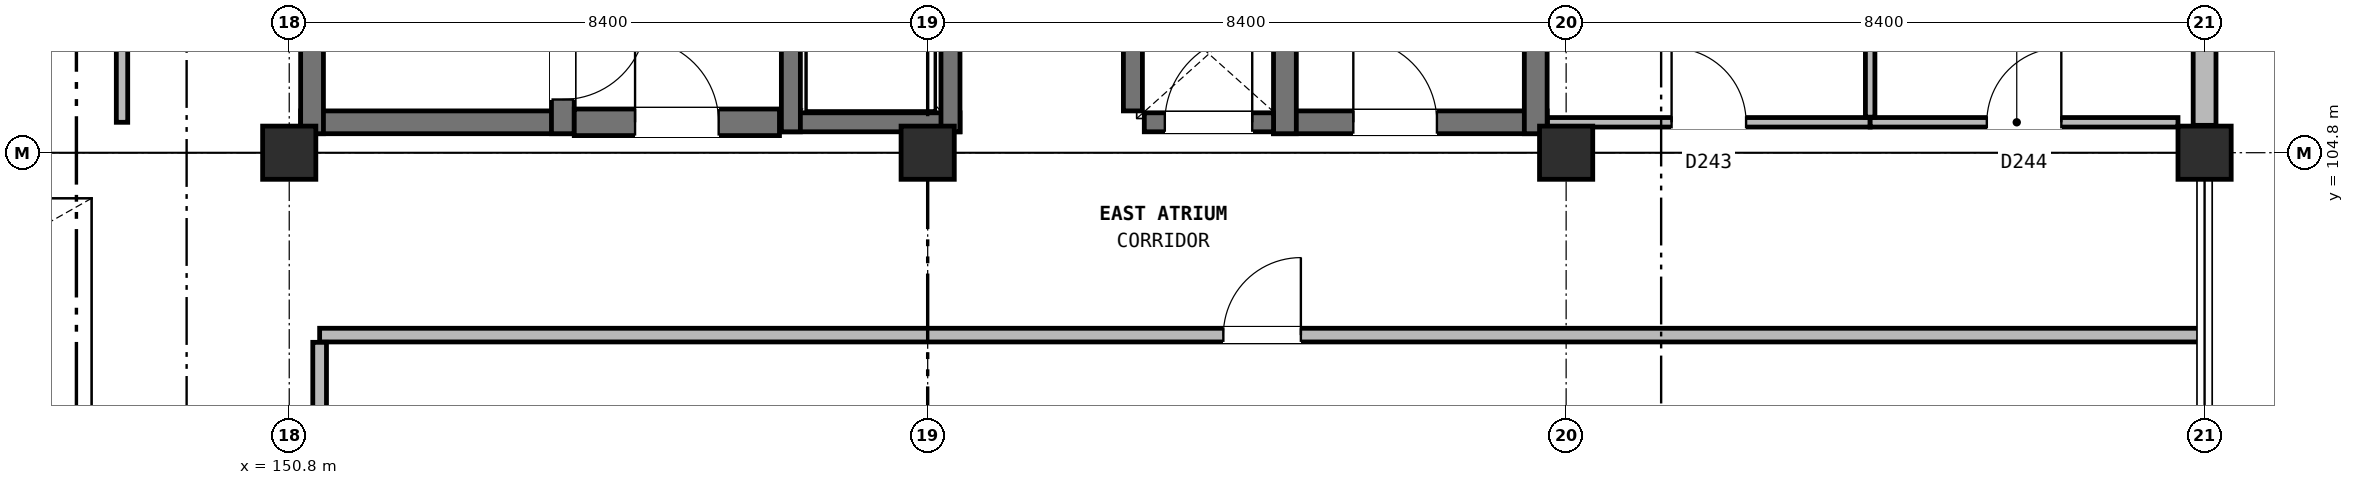
"""IFC4 building model, lengths in metres.
Left out: names, types, materials, properties, quantities, classifications, styles, units other than length and angle.
Written with IfcOpenShell. Run it as: python <this file> out.ifc"""

import sys

from ifc_helpers import new_model, si_unit, direction, frame, frame_2d, origin, origin_2d, place, context, subcontext, project, spatial, rectangle, extrude, element, fill, save


model = new_model("IFC4")
c1 = context("Model", 3, precision=1e-05, world=origin(), true_north=direction((0.0, 1.0)))
c2 = subcontext(c1, "Body", "Model", "MODEL_VIEW")
j1 = project(units=[si_unit("LENGTHUNIT", "METRE"), si_unit("PLANEANGLEUNIT", "RADIAN")], contexts=[c1])
p1 = place(None, origin())
s1 = spatial("IfcSite", under=j1, at=p1, CompositionType="ELEMENT")
p2 = place(p1, origin())
s2 = spatial("IfcBuilding", under=s1, at=p2, CompositionType="ELEMENT")
p3 = place(p2, frame((0.0, 0.0, 40.6)))
s3 = spatial("IfcBuildingStorey", under=s2, at=p3, CompositionType="ELEMENT", Elevation=40.6)
for number, where, z_axis, x_axis in (
    (1, (150.8, 104.8, 0.0), (0.0, 0.0, 1.0), (1.0, 0.0, 0.0)),
    (2, (159.2, 104.8, 0.0), (0.0, 0.0, 1.0), (1.0, 0.0, 0.0)),
    (3, (167.6, 104.8, 0.0), (0.0, 0.0, 1.0), (1.0, 0.0, 0.0)),
    (4, (176.0, 104.8, 0.0), (0.0, 0.0, 1.0), (1.0, 0.0, 0.0)),
):
    element("IfcColumn", number, at=place(p3, frame(where, z_axis=z_axis, x_axis=x_axis)), inside=s3, PredefinedType="COLUMN", context=c2, shape_type="SweptSolid", body=[
        extrude(rectangle(XDim=0.7, YDim=0.7, at=origin_2d()), origin(), (0.0, 0.0, 1.0), 3.8),
    ])
p4 = place(p3, frame((176.0, 105.16, 0.0), z_axis=(0.0, 0.0, 1.0), x_axis=(0.0, 1.0, 0.0)))
e5 = element("IfcWall", 5, at=p4, inside=s3, PredefinedType="SOLIDWALL", context=c2, shape_type="SweptSolid", body=[
    extrude(rectangle(XDim=8.08, YDim=0.3, at=frame_2d((4.04, 0.0))), origin(), (0.0, 0.0, 1.0), 3.05),
])
p5 = place(p4, frame((3.28, 0.0, 0.9)))
e6 = element("IfcOpeningElement", 6, at=p5, cuts=e5, PredefinedType="OPENING", context=c2, shape_type="SweptSolid", body=[
    extrude(rectangle(XDim=1.56, YDim=1.88, at=frame_2d((0.78, 0.94))), frame((0.0, 0.16, 0.0), z_axis=(0.0, -1.0, 0.0), x_axis=(1.0, 0.0, 0.0)), (0.0, 0.0, 1.0), 0.32),
])
p6 = place(p3, frame((150.95, 105.2, 0.0), z_axis=(0.0, 0.0, 1.0), x_axis=(1.0, 0.0, 0.0)))
e7 = element("IfcWall", 7, at=p6, inside=s3, PredefinedType="SHEAR", context=c2, shape_type="SweptSolid", body=[
    extrude(rectangle(XDim=3.6, YDim=0.3, at=frame_2d((1.8, 0.0))), origin(), (0.0, 0.0, 1.0), 3.8),
])
p7 = place(p3, frame((151.1, 105.05, 0.0), z_axis=(0.0, 0.0, 1.0), x_axis=(0.0, 1.0, 0.0)))
e8 = element("IfcWall", 8, at=p7, inside=s3, PredefinedType="SHEAR", context=c2, shape_type="SweptSolid", body=[
    extrude(rectangle(XDim=8.3, YDim=0.3, at=frame_2d((4.15, 0.0))), origin(), (0.0, 0.0, 1.0), 3.8),
])
p8 = place(p3, frame((154.4, 105.05, 0.0), z_axis=(0.0, 0.0, 1.0), x_axis=(0.0, 1.0, 0.0)))
e9 = element("IfcWall", 9, at=p8, inside=s3, PredefinedType="SHEAR", context=c2, shape_type="SweptSolid", body=[
    extrude(rectangle(XDim=8.3, YDim=0.3, at=frame_2d((4.15, 0.0))), origin(), (0.0, 0.0, 1.0), 3.8),
])
p9 = place(p8, frame((0.45, 0.0, 0.0)))
e10 = element("IfcOpeningElement", 10, at=p9, cuts=e9, PredefinedType="OPENING", context=c2, shape_type="SweptSolid", body=[
    extrude(rectangle(XDim=1.1, YDim=2.2, at=frame_2d((0.55, 1.1))), frame((0.0, 0.16, 0.0), z_axis=(0.0, -1.0, 0.0), x_axis=(1.0, 0.0, 0.0)), (0.0, 0.0, 1.0), 0.32),
])
p10 = place(p3, frame((163.75, 105.2, 0.0), z_axis=(0.0, 0.0, 1.0), x_axis=(1.0, 0.0, 0.0)))
e11 = element("IfcWall", 11, at=p10, inside=s3, PredefinedType="SHEAR", context=c2, shape_type="SweptSolid", body=[
    extrude(rectangle(XDim=3.6, YDim=0.3, at=frame_2d((1.8, 0.0))), origin(), (0.0, 0.0, 1.0), 3.8),
])
p11 = place(p10, frame((1.05, 0.0, 0.0)))
e12 = element("IfcOpeningElement", 12, at=p11, cuts=e11, PredefinedType="OPENING", context=c2, shape_type="SweptSolid", body=[
    extrude(rectangle(XDim=1.1, YDim=2.2, at=frame_2d((0.55, 1.1))), frame((0.0, 0.16, 0.0), z_axis=(0.0, -1.0, 0.0), x_axis=(1.0, 0.0, 0.0)), (0.0, 0.0, 1.0), 0.32),
])
for number, where, z_axis, x_axis in (
    (13, (163.9, 105.05, 0.0), (0.0, 0.0, 1.0), (0.0, 1.0, 0.0)),
    (14, (167.2, 105.05, 0.0), (0.0, 0.0, 1.0), (0.0, 1.0, 0.0)),
):
    element("IfcWall", number, at=place(p3, frame(where, z_axis=z_axis, x_axis=x_axis)), inside=s3, PredefinedType="SHEAR", context=c2, shape_type="SweptSolid", body=[
        extrude(rectangle(XDim=8.3, YDim=0.3, at=frame_2d((4.15, 0.0))), origin(), (0.0, 0.0, 1.0), 3.8),
    ])
p12 = place(p3, frame((157.275, 105.2, 0.0), z_axis=(0.0, 0.0, 1.0), x_axis=(1.0, 0.0, 0.0)))
e15 = element("IfcWall", 15, at=p12, inside=s3, PredefinedType="SOLIDWALL", context=c2, shape_type="SweptSolid", body=[
    extrude(rectangle(XDim=2.35, YDim=0.25, at=frame_2d((1.175, 0.0))), origin(), (0.0, 0.0, 1.0), 3.48),
])
for number, where, z_axis, x_axis in (
    (16, (157.4, 105.075, 0.0), (0.0, 0.0, 1.0), (0.0, 1.0, 0.0)),
    (17, (159.5, 105.075, 0.0), (0.0, 0.0, 1.0), (0.0, 1.0, 0.0)),
):
    element("IfcWall", number, at=place(p3, frame(where, z_axis=z_axis, x_axis=x_axis)), inside=s3, PredefinedType="SOLIDWALL", context=c2, shape_type="SweptSolid", body=[
        extrude(rectangle(XDim=2.65, YDim=0.25, at=frame_2d((1.325, 0.0))), origin(), (0.0, 0.0, 1.0), 3.48),
    ])
p13 = place(p3, frame((154.55, 105.2, 0.0), z_axis=(0.0, 0.0, 1.0), x_axis=(1.0, 0.0, 0.0)))
e18 = element("IfcWall", 18, at=p13, inside=s3, PredefinedType="SHEAR", context=c2, shape_type="SweptSolid", body=[
    extrude(rectangle(XDim=2.7, YDim=0.35, at=frame_2d((1.35, 0.0))), origin(), (0.0, 0.0, 1.0), 3.48),
])
p14 = place(p13, frame((0.8, 0.0, 0.0)))
e19 = element("IfcOpeningElement", 19, at=p14, cuts=e18, PredefinedType="OPENING", context=c2, shape_type="SweptSolid", body=[
    extrude(rectangle(XDim=1.1, YDim=2.2, at=frame_2d((0.55, 1.1))), frame((0.0, 0.185, 0.0), z_axis=(0.0, -1.0, 0.0), x_axis=(1.0, 0.0, 0.0)), (0.0, 0.0, 1.0), 0.37),
])
p15 = place(p3, frame((161.9, 105.35, 0.0), z_axis=(0.0, 0.0, 1.0), x_axis=(0.0, 1.0, 0.0)))
e20 = element("IfcWall", 20, at=p15, inside=s3, PredefinedType="SOLIDWALL", context=c2, shape_type="SweptSolid", body=[
    extrude(rectangle(XDim=1.5, YDim=0.25, at=frame_2d((0.75, 0.0))), origin(), (0.0, 0.0, 1.0), 3.48),
])
p16 = place(p3, frame((162.05, 105.2, 0.0), z_axis=(0.0, 0.0, 1.0), x_axis=(1.0, 0.0, 0.0)))
e21 = element("IfcWall", 21, at=p16, inside=s3, PredefinedType="SOLIDWALL", context=c2, shape_type="SweptSolid", body=[
    extrude(rectangle(XDim=1.7, YDim=0.25, at=frame_2d((0.85, 0.0))), origin(), (0.0, 0.0, 1.0), 3.48),
])
p17 = place(p16, frame((0.27, 0.0, 0.0)))
e22 = element("IfcOpeningElement", 22, at=p17, cuts=e21, PredefinedType="OPENING", context=c2, shape_type="SweptSolid", body=[
    extrude(rectangle(XDim=1.15, YDim=2.2, at=frame_2d((0.575, 1.1))), frame((0.0, 0.135, 0.0), z_axis=(0.0, -1.0, 0.0), x_axis=(1.0, 0.0, 0.0)), (0.0, 0.0, 1.0), 0.27),
])
p18 = place(p3, frame((151.2, 102.4, 0.0), z_axis=(0.0, 0.0, 1.0), x_axis=(1.0, 0.0, 0.0)))
e23 = element("IfcWall", 23, at=p18, inside=s3, PredefinedType="PARTITIONING", context=c2, shape_type="SweptSolid", body=[
    extrude(rectangle(XDim=24.8, YDim=0.18, at=frame_2d((12.4, 0.0))), origin(), (0.0, 0.0, 1.0), 3.465),
])
p19 = place(p18, frame((11.89, 0.0, 0.0)))
e24 = element("IfcOpeningElement", 24, at=p19, cuts=e23, PredefinedType="OPENING", context=c2, shape_type="SweptSolid", body=[
    extrude(rectangle(XDim=1.02, YDim=2.16, at=frame_2d((0.51, 1.08))), frame((0.0, 0.1, 0.0), z_axis=(0.0, -1.0, 0.0), x_axis=(1.0, 0.0, 0.0)), (0.0, 0.0, 1.0), 0.2),
])
p20 = place(p3, frame((167.355, 105.2, 0.0), z_axis=(0.0, 0.0, 1.0), x_axis=(1.0, 0.0, 0.0)))
e25 = element("IfcWall", 25, at=p20, inside=s3, PredefinedType="PARTITIONING", context=c2, shape_type="SweptSolid", body=[
    extrude(rectangle(XDim=4.245, YDim=0.125, at=frame_2d((2.123, 0.0))), origin(), (0.0, 0.0, 1.0), 3.045),
])
p21 = place(p20, frame((1.633, 0.0, 0.0)))
e26 = element("IfcOpeningElement", 26, at=p21, cuts=e25, PredefinedType="OPENING", context=c2, shape_type="SweptSolid", body=[
    extrude(rectangle(XDim=0.98, YDim=2.1, at=frame_2d((0.49, 1.05))), frame((0.0, 0.073, 0.0), z_axis=(0.0, -1.0, 0.0), x_axis=(1.0, 0.0, 0.0)), (0.0, 0.0, 1.0), 0.145),
])
p22 = place(p3, frame((171.6, 105.2, 0.0), z_axis=(0.0, 0.0, 1.0), x_axis=(1.0, 0.0, 0.0)))
e27 = element("IfcWall", 27, at=p22, inside=s3, PredefinedType="PARTITIONING", context=c2, shape_type="SweptSolid", body=[
    extrude(rectangle(XDim=4.05, YDim=0.125, at=frame_2d((2.025, 0.0))), origin(), (0.0, 0.0, 1.0), 3.045),
])
p23 = place(p22, frame((1.535, 0.0, 0.0)))
e28 = element("IfcOpeningElement", 28, at=p23, cuts=e27, PredefinedType="OPENING", context=c2, shape_type="SweptSolid", body=[
    extrude(rectangle(XDim=0.98, YDim=2.1, at=frame_2d((0.49, 1.05))), frame((0.0, 0.073, 0.0), z_axis=(0.0, -1.0, 0.0), x_axis=(1.0, 0.0, 0.0)), (0.0, 0.0, 1.0), 0.145),
])
p24 = place(p3, frame((151.2, 94.8, 0.0), z_axis=(0.0, 0.0, 1.0), x_axis=(0.0, 1.0, 0.0)))
e29 = element("IfcWall", 29, at=p24, inside=s3, PredefinedType="PARTITIONING", context=c2, shape_type="SweptSolid", body=[
    extrude(rectangle(XDim=7.505, YDim=0.18, at=frame_2d((3.752, 0.0))), origin(), (0.0, 0.0, 1.0), 3.045),
])
p25 = place(p3, frame((148.6, 105.2, 0.0), z_axis=(0.0, 0.0, 1.0), x_axis=(0.0, 1.0, 0.0)))
e30 = element("IfcWall", 30, at=p25, inside=s3, PredefinedType="PARTITIONING", context=c2, shape_type="SweptSolid", body=[
    extrude(rectangle(XDim=14.2, YDim=0.15, at=frame_2d((7.1, 0.0))), origin(), (0.0, 0.0, 1.0), 3.465),
])
p26 = place(p25, frame((6.43, 0.0, 0.0)))
e31 = element("IfcOpeningElement", 31, at=p26, cuts=e30, PredefinedType="OPENING", context=c2, shape_type="SweptSolid", body=[
    extrude(rectangle(XDim=1.34, YDim=2.24, at=frame_2d((0.67, 1.12))), frame((0.0, 0.085, 0.0), z_axis=(0.0, -1.0, 0.0), x_axis=(1.0, 0.0, 0.0)), (0.0, 0.0, 1.0), 0.17),
])
p27 = place(p3, frame((171.6, 105.268, 0.0), z_axis=(0.0, 0.0, 1.0), x_axis=(0.0, 1.0, 0.0)))
e32 = element("IfcWall", 32, at=p27, inside=s3, PredefinedType="PARTITIONING", context=c2, shape_type="SweptSolid", body=[
    extrude(rectangle(XDim=16.978, YDim=0.125, at=frame_2d((8.489, 0.0))), origin(), (0.0, 0.0, 1.0), 3.465),
])
p28 = place(p9, frame((1.1, 0.0, 0.0), z_axis=(0.0, 0.0, 1.0), x_axis=(-1.0, 0.0, 0.0)))
e33 = element("IfcDoor", 33, at=p28, inside=s3, OperationType="SINGLE_SWING_RIGHT", PredefinedType="DOOR", context=c2, shape_type="SweptSolid", body=[
    extrude(rectangle(XDim=1.1, YDim=2.2, at=frame_2d((0.55, 1.1))), frame((0.0, 0.025, 0.0), z_axis=(0.0, -1.0, 0.0), x_axis=(1.0, 0.0, 0.0)), (0.0, 0.0, 1.0), 0.05),
])
fill(e10, e33)
p29 = place(p11, origin())
e34 = element("IfcDoor", 34, at=p29, inside=s3, OperationType="SINGLE_SWING_LEFT", PredefinedType="DOOR", context=c2, shape_type="SweptSolid", body=[
    extrude(rectangle(XDim=1.1, YDim=2.2, at=frame_2d((0.55, 1.1))), frame((0.0, 0.025, 0.0), z_axis=(0.0, -1.0, 0.0), x_axis=(1.0, 0.0, 0.0)), (0.0, 0.0, 1.0), 0.05),
])
fill(e12, e34)
p30 = place(p14, origin())
e35 = element("IfcDoor", 35, at=p30, inside=s3, OperationType="SINGLE_SWING_LEFT", PredefinedType="DOOR", context=c2, shape_type="SweptSolid", body=[
    extrude(rectangle(XDim=1.1, YDim=2.2, at=frame_2d((0.55, 1.1))), frame((0.0, 0.025, 0.0), z_axis=(0.0, -1.0, 0.0), x_axis=(1.0, 0.0, 0.0)), (0.0, 0.0, 1.0), 0.05),
])
fill(e19, e35)
p31 = place(p17, origin())
e36 = element("IfcDoor", 36, at=p31, inside=s3, OperationType="SINGLE_SWING_RIGHT", PredefinedType="DOOR", context=c2, shape_type="SweptSolid", body=[
    extrude(rectangle(XDim=1.15, YDim=2.2, at=frame_2d((0.575, 1.1))), frame((0.0, 0.025, 0.0), z_axis=(0.0, -1.0, 0.0), x_axis=(1.0, 0.0, 0.0)), (0.0, 0.0, 1.0), 0.05),
])
fill(e22, e36)
p32 = place(p19, origin())
e37 = element("IfcDoor", 37, at=p32, inside=s3, OperationType="SINGLE_SWING_RIGHT", PredefinedType="DOOR", context=c2, shape_type="SweptSolid", body=[
    extrude(rectangle(XDim=1.02, YDim=2.16, at=frame_2d((0.51, 1.08))), frame((0.0, 0.025, 0.0), z_axis=(0.0, -1.0, 0.0), x_axis=(1.0, 0.0, 0.0)), (0.0, 0.0, 1.0), 0.05),
])
fill(e24, e37)
p33 = place(p21, origin())
e38 = element("IfcDoor", 38, at=p33, inside=s3, OperationType="SINGLE_SWING_LEFT", PredefinedType="DOOR", context=c2, shape_type="SweptSolid", body=[
    extrude(rectangle(XDim=0.98, YDim=2.1, at=frame_2d((0.49, 1.05))), frame((0.0, 0.025, 0.0), z_axis=(0.0, -1.0, 0.0), x_axis=(1.0, 0.0, 0.0)), (0.0, 0.0, 1.0), 0.05),
])
fill(e26, e38)
p34 = place(p23, origin())
e39 = element("IfcDoor", 39, at=p34, inside=s3, OperationType="SINGLE_SWING_RIGHT", PredefinedType="DOOR", context=c2, shape_type="SweptSolid", body=[
    extrude(rectangle(XDim=0.98, YDim=2.1, at=frame_2d((0.49, 1.05))), frame((0.0, 0.025, 0.0), z_axis=(0.0, -1.0, 0.0), x_axis=(1.0, 0.0, 0.0)), (0.0, 0.0, 1.0), 0.05),
])
fill(e28, e39)
save(model, sys.argv[1])
